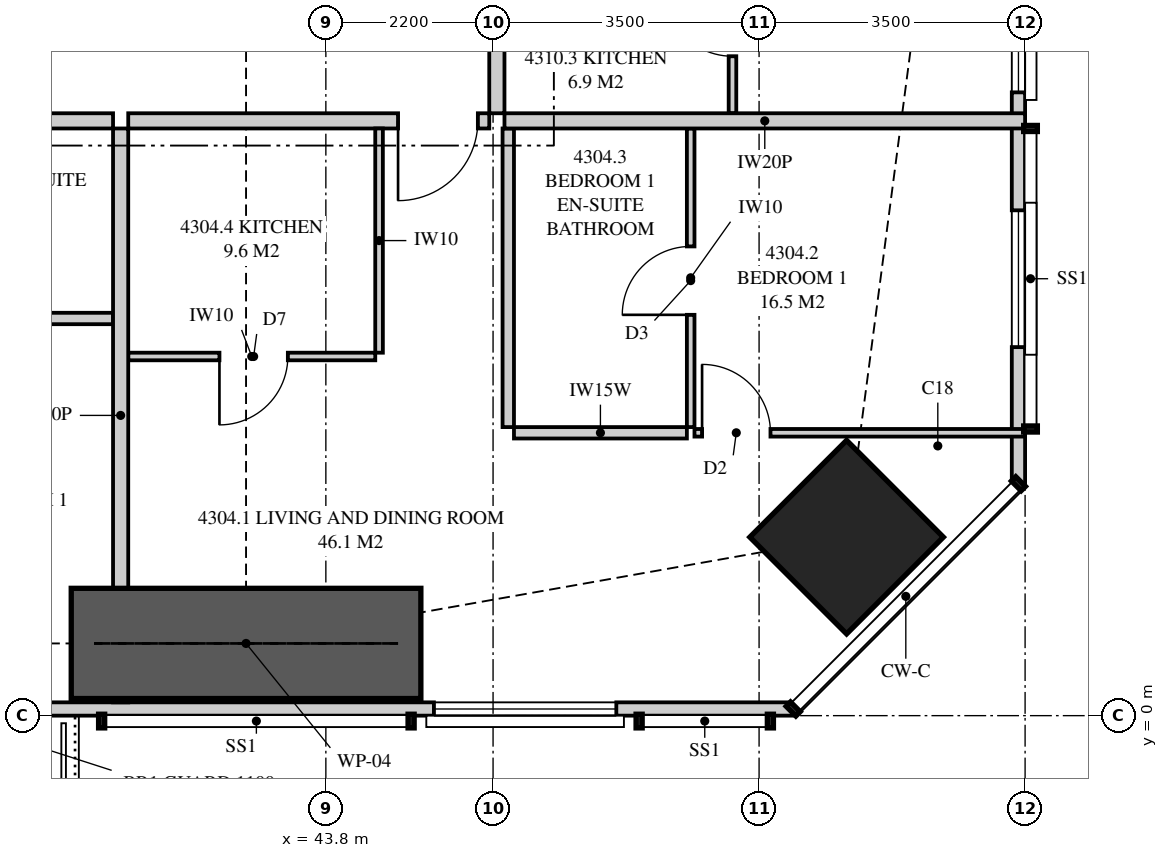
"""IFC4 building model, lengths in metres.
Left out: names, types, materials, properties, quantities, classifications, styles, units other than length and angle.
Written with IfcOpenShell. Run it as: python <this file> out.ifc"""

import sys

from ifc_helpers import new_model, si_unit, direction, frame, frame_2d, origin, origin_2d, place, context, subcontext, project, spatial, polyline, rectangle, outline, extrude, element, fill, save


model = new_model("IFC4")
c1 = context("Model", 3, precision=1e-05, world=origin(), true_north=direction((0.0, 1.0)))
c2 = subcontext(c1, "Body", "Model", "MODEL_VIEW")
j1 = project(units=[si_unit("LENGTHUNIT", "METRE"), si_unit("PLANEANGLEUNIT", "RADIAN")], contexts=[c1])
p1 = place(None, origin())
s1 = spatial("IfcSite", under=j1, at=p1, CompositionType="ELEMENT")
p2 = place(p1, origin())
s2 = spatial("IfcBuilding", under=s1, at=p2, CompositionType="ELEMENT")
p3 = place(p2, frame((0.0, 0.0, 161.05)))
s3 = spatial("IfcBuildingStorey", under=s2, at=p3, CompositionType="ELEMENT", Elevation=161.05)
p4 = place(p3, frame((50.652, 2.348, 0.0), z_axis=(0.0, 0.0, 1.0), x_axis=(0.707106781187, 0.707106781187, 0.0)))
e1 = element("IfcColumn", 1, at=p4, inside=s3, PredefinedType="COLUMN", context=c2, shape_type="SweptSolid", body=[
    extrude(rectangle(XDim=1.8, YDim=1.8, at=origin_2d()), origin(), (0.0, 0.0, 1.0), 3.35),
])
p5 = place(p3, frame((15.051, 0.087, 0.0), z_axis=(0.0, 0.0, 1.0), x_axis=(1.0, 0.0, 0.0)))
e2 = element("IfcWall", 2, at=p5, inside=s3, PredefinedType="SOLIDWALL", context=c2, shape_type="SweptSolid", body=[
    extrude(outline(polyline([(0.0, 0.0), (34.897, 0.0), (34.897, 3.11), (27.91, 3.11), (27.91, 2.15), (27.836, 2.15), (27.836, 3.11), (27.699, 3.11), (27.699, 2.15), (7.199, 2.15), (7.199, 3.11), (7.062, 3.11), (7.062, 2.15), (6.987, 2.15), (6.987, 3.11), (0.0, 3.11), (0.0, 0.0)])), frame((0.0, 0.087, 0.0), z_axis=(0.0, -1.0, 0.0), x_axis=(1.0, 0.0, 0.0)), (0.0, 0.0, 1.0), 0.175),
])
p6 = place(p5, frame((1.625, 0.0, 0.4)))
e3 = element("IfcOpeningElement", 3, at=p6, cuts=e2, PredefinedType="OPENING", context=c2, shape_type="SweptSolid", body=[
    extrude(rectangle(XDim=2.4, YDim=1.7, at=frame_2d((1.2, 0.85))), frame((0.0, 0.097, 0.0), z_axis=(0.0, -1.0, 0.0), x_axis=(1.0, 0.0, 0.0)), (0.0, 0.0, 1.0), 0.195),
])
p7 = place(p5, frame((10.399, 0.0, 0.0)))
e4 = element("IfcOpeningElement", 4, at=p7, cuts=e2, PredefinedType="OPENING", context=c2, shape_type="SweptSolid", body=[
    extrude(rectangle(XDim=1.8, YDim=2.1, at=frame_2d((0.9, 1.05))), frame((0.0, 0.097, 0.0), z_axis=(0.0, -1.0, 0.0), x_axis=(1.0, 0.0, 0.0)), (0.0, 0.0, 1.0), 0.195),
])
p8 = place(p5, frame((13.224, 0.0, 0.4)))
e5 = element("IfcOpeningElement", 5, at=p8, cuts=e2, PredefinedType="OPENING", context=c2, shape_type="SweptSolid", body=[
    extrude(rectangle(XDim=1.8, YDim=1.7, at=frame_2d((0.9, 0.85))), frame((0.0, 0.097, 0.0), z_axis=(0.0, -1.0, 0.0), x_axis=(1.0, 0.0, 0.0)), (0.0, 0.0, 1.0), 0.195),
])
p9 = place(p5, frame((19.849, 0.0, 0.4)))
e6 = element("IfcOpeningElement", 6, at=p9, cuts=e2, PredefinedType="OPENING", context=c2, shape_type="SweptSolid", body=[
    extrude(rectangle(XDim=2.4, YDim=1.7, at=frame_2d((1.2, 0.85))), frame((0.0, 0.097, 0.0), z_axis=(0.0, -1.0, 0.0), x_axis=(1.0, 0.0, 0.0)), (0.0, 0.0, 1.0), 0.195),
])
p10 = place(p5, frame((22.799, 0.0, 0.0)))
e7 = element("IfcOpeningElement", 7, at=p10, cuts=e2, PredefinedType="OPENING", context=c2, shape_type="SweptSolid", body=[
    extrude(rectangle(XDim=1.8, YDim=2.1, at=frame_2d((0.9, 1.05))), frame((0.0, 0.097, 0.0), z_axis=(0.0, -1.0, 0.0), x_axis=(1.0, 0.0, 0.0)), (0.0, 0.0, 1.0), 0.195),
])
p11 = place(p5, frame((30.17, 0.0, 0.4)))
e8 = element("IfcOpeningElement", 8, at=p11, cuts=e2, PredefinedType="OPENING", context=c2, shape_type="SweptSolid", body=[
    extrude(rectangle(XDim=2.4, YDim=1.7, at=frame_2d((1.2, 0.85))), frame((0.0, 0.097, 0.0), z_axis=(0.0, -1.0, 0.0), x_axis=(1.0, 0.0, 0.0)), (0.0, 0.0, 1.0), 0.195),
])
p12 = place(p3, frame((52.913, 3.051, 0.0), z_axis=(0.0, 0.0, 1.0), x_axis=(0.0, 1.0, 0.0)))
e9 = element("IfcWall", 9, at=p12, inside=s3, PredefinedType="SOLIDWALL", context=c2, shape_type="SweptSolid", body=[
    extrude(outline(polyline([(0.0, 0.0), (29.897, 0.0), (29.897, 3.11), (22.167, 3.11), (22.167, 2.15), (22.074, 2.15), (22.074, 3.11), (21.949, 3.11), (21.949, 2.15), (9.949, 2.15), (9.949, 3.11), (9.847, 3.11), (9.847, 2.15), (9.706, 2.15), (9.706, 3.11), (0.0, 3.11), (0.0, 0.0)])), frame((0.0, 0.087, 0.0), z_axis=(0.0, -1.0, 0.0), x_axis=(1.0, 0.0, 0.0)), (0.0, 0.0, 1.0), 0.175),
])
p13 = place(p12, frame((1.797, 0.0, 0.4)))
e10 = element("IfcOpeningElement", 10, at=p13, cuts=e9, PredefinedType="OPENING", context=c2, shape_type="SweptSolid", body=[
    extrude(rectangle(XDim=1.8, YDim=1.7, at=frame_2d((0.9, 0.85))), frame((0.0, 0.097, 0.0), z_axis=(0.0, -1.0, 0.0), x_axis=(1.0, 0.0, 0.0)), (0.0, 0.0, 1.0), 0.195),
])
p14 = place(p12, frame((5.149, 0.0, 0.4)))
e11 = element("IfcOpeningElement", 11, at=p14, cuts=e9, PredefinedType="OPENING", context=c2, shape_type="SweptSolid", body=[
    extrude(rectangle(XDim=2.4, YDim=1.7, at=frame_2d((1.2, 0.85))), frame((0.0, 0.097, 0.0), z_axis=(0.0, -1.0, 0.0), x_axis=(1.0, 0.0, 0.0)), (0.0, 0.0, 1.0), 0.195),
])
p15 = place(p12, frame((15.274, 0.0, 0.0)))
e12 = element("IfcOpeningElement", 12, at=p15, cuts=e9, PredefinedType="OPENING", context=c2, shape_type="SweptSolid", body=[
    extrude(rectangle(XDim=1.8, YDim=2.1, at=frame_2d((0.9, 1.05))), frame((0.0, 0.097, 0.0), z_axis=(0.0, -1.0, 0.0), x_axis=(1.0, 0.0, 0.0)), (0.0, 0.0, 1.0), 0.195),
])
p16 = place(p12, frame((12.349, 0.0, 0.4)))
e13 = element("IfcOpeningElement", 13, at=p16, cuts=e9, PredefinedType="OPENING", context=c2, shape_type="SweptSolid", body=[
    extrude(rectangle(XDim=2.4, YDim=1.7, at=frame_2d((1.2, 0.85))), frame((0.0, 0.097, 0.0), z_axis=(0.0, -1.0, 0.0), x_axis=(1.0, 0.0, 0.0)), (0.0, 0.0, 1.0), 0.195),
])
p17 = place(p12, frame((24.373, 0.0, 0.4)))
e14 = element("IfcOpeningElement", 14, at=p17, cuts=e9, PredefinedType="OPENING", context=c2, shape_type="SweptSolid", body=[
    extrude(rectangle(XDim=1.2, YDim=1.7, at=frame_2d((0.6, 0.85))), frame((0.0, 0.097, 0.0), z_axis=(0.0, -1.0, 0.0), x_axis=(1.0, 0.0, 0.0)), (0.0, 0.0, 1.0), 0.195),
])
p18 = place(p12, frame((26.801, 0.0, 0.4)))
e15 = element("IfcOpeningElement", 15, at=p18, cuts=e9, PredefinedType="OPENING", context=c2, shape_type="SweptSolid", body=[
    extrude(rectangle(XDim=1.8, YDim=1.7, at=frame_2d((0.9, 0.85))), frame((0.0, 0.097, 0.0), z_axis=(0.0, -1.0, 0.0), x_axis=(1.0, 0.0, 0.0)), (0.0, 0.0, 1.0), 0.195),
])
p19 = place(p3, frame((41.1, 0.175, 0.0), z_axis=(0.0, 0.0, 1.0), x_axis=(0.0, 1.0, 0.0)))
e16 = element("IfcWall", 16, at=p19, inside=s3, PredefinedType="PARTITIONING", context=c2, shape_type="SweptSolid", body=[
    extrude(outline(polyline([(0.529, 2.15), (0.0, 2.15), (0.0, 0.0), (0.529, 0.0), (0.529, 0.165), (1.021, 0.165), (1.021, 0.0), (7.55, 0.0), (7.55, 3.11), (1.685, 3.11), (1.685, 2.15), (1.021, 2.15), (1.021, 1.985), (0.529, 1.985), (0.529, 2.15)])), frame((0.0, 0.1, 0.0), z_axis=(0.0, -1.0, 0.0), x_axis=(1.0, 0.0, 0.0)), (0.0, 0.0, 1.0), 0.2),
])
p20 = place(p3, frame((37.55, 5.225, 0.0), z_axis=(0.0, 0.0, 1.0), x_axis=(1.0, 0.0, 0.0)))
e17 = element("IfcWall", 17, at=p20, inside=s3, PredefinedType="PLUMBINGWALL", context=c2, shape_type="SweptSolid", body=[
    extrude(rectangle(XDim=3.45, YDim=0.15, at=frame_2d((1.725, 0.0))), origin(), (0.0, 0.0, 1.0), 3.11),
])
p21 = place(p20, frame((0.4, 0.0, 0.0)))
e18 = element("IfcOpeningElement", 18, at=p21, cuts=e17, PredefinedType="OPENING", context=c2, shape_type="SweptSolid", body=[
    extrude(rectangle(XDim=0.9, YDim=2.1, at=frame_2d((0.45, 1.05))), frame((0.0, 0.085, 0.0), z_axis=(0.0, -1.0, 0.0), x_axis=(1.0, 0.0, 0.0)), (0.0, 0.0, 1.0), 0.17),
])
p22 = place(p3, frame((41.2, 7.825, 0.0), z_axis=(0.0, 0.0, 1.0), x_axis=(1.0, 0.0, 0.0)))
e19 = element("IfcWall", 19, at=p22, inside=s3, PredefinedType="PARTITIONING", context=c2, shape_type="SweptSolid", body=[
    extrude(outline(polyline([(0.0, 0.0), (4.75, 0.0), (4.75, 3.11), (1.887, 3.11), (1.887, 2.541), (1.213, 2.541), (1.213, 3.11), (0.0, 3.11), (0.0, 0.0)])), frame((0.0, 0.1, 0.0), z_axis=(0.0, -1.0, 0.0), x_axis=(1.0, 0.0, 0.0)), (0.0, 0.0, 1.0), 0.2),
])
p23 = place(p22, frame((3.55, 0.0, 0.0)))
e20 = element("IfcOpeningElement", 20, at=p23, cuts=e19, PredefinedType="OPENING", context=c2, shape_type="SweptSolid", body=[
    extrude(rectangle(XDim=1.05, YDim=2.2, at=frame_2d((0.525, 1.1))), frame((0.0, 0.11, 0.0), z_axis=(0.0, -1.0, 0.0), x_axis=(1.0, 0.0, 0.0)), (0.0, 0.0, 1.0), 0.22),
])
p24 = place(p3, frame((48.6, 3.796, 0.0), z_axis=(0.0, 0.0, 1.0), x_axis=(0.0, 1.0, 0.0)))
e21 = element("IfcWall", 21, at=p24, inside=s3, PredefinedType="PARTITIONING", context=c2, shape_type="SweptSolid", body=[
    extrude(rectangle(XDim=3.929, YDim=0.1, at=frame_2d((1.964, 0.0))), origin(), (0.0, 0.0, 1.0), 3.11),
])
p25 = place(p24, frame((1.477, 0.0, 0.0)))
e22 = element("IfcOpeningElement", 22, at=p25, cuts=e21, PredefinedType="OPENING", context=c2, shape_type="SweptSolid", body=[
    extrude(rectangle(XDim=0.9, YDim=2.1, at=frame_2d((0.45, 1.05))), frame((0.0, 0.06, 0.0), z_axis=(0.0, -1.0, 0.0), x_axis=(1.0, 0.0, 0.0)), (0.0, 0.0, 1.0), 0.12),
])
p26 = place(p3, frame((48.65, 3.721, 0.0), z_axis=(0.0, 0.0, 1.0), x_axis=(1.0, 0.0, 0.0)))
e23 = element("IfcWall", 23, at=p26, inside=s3, PredefinedType="PARTITIONING", context=c2, shape_type="SweptSolid", body=[
    extrude(outline(polyline([(0.0, 0.0), (4.35, 0.0), (4.35, 3.11), (3.049, 3.11), (3.049, 2.15), (1.314, 2.15), (1.314, 3.11), (0.0, 3.11), (0.0, 0.0)])), frame((0.0, 0.05, 0.0), z_axis=(0.0, -1.0, 0.0), x_axis=(1.0, 0.0, 0.0)), (0.0, 0.0, 1.0), 0.1),
])
p27 = place(p26, frame((0.1, 0.0, 0.0)))
e24 = element("IfcOpeningElement", 24, at=p27, cuts=e23, PredefinedType="OPENING", context=c2, shape_type="SweptSolid", body=[
    extrude(rectangle(XDim=0.9, YDim=2.1, at=frame_2d((0.45, 1.05))), frame((0.0, 0.06, 0.0), z_axis=(0.0, -1.0, 0.0), x_axis=(1.0, 0.0, 0.0)), (0.0, 0.0, 1.0), 0.12),
])
p28 = place(p3, frame((46.275, 3.721, 0.0), z_axis=(0.0, 0.0, 1.0), x_axis=(1.0, 0.0, 0.0)))
e25 = element("IfcWall", 25, at=p28, inside=s3, PredefinedType="PLUMBINGWALL", context=c2, shape_type="SweptSolid", body=[
    extrude(rectangle(XDim=2.275, YDim=0.15, at=frame_2d((1.138, 0.0))), origin(), (0.0, 0.0, 1.0), 3.11),
])
p29 = place(p3, frame((46.2, 3.796, 0.0), z_axis=(0.0, 0.0, 1.0), x_axis=(0.0, 1.0, 0.0)))
e26 = element("IfcWall", 26, at=p29, inside=s3, PredefinedType="PLUMBINGWALL", context=c2, shape_type="SweptSolid", body=[
    extrude(rectangle(XDim=3.929, YDim=0.15, at=frame_2d((1.964, 0.0))), origin(), (0.0, 0.0, 1.0), 3.11),
])
p30 = place(p3, frame((41.2, 4.725, 0.0), z_axis=(0.0, 0.0, 1.0), x_axis=(1.0, 0.0, 0.0)))
e27 = element("IfcWall", 27, at=p30, inside=s3, PredefinedType="PARTITIONING", context=c2, shape_type="SweptSolid", body=[
    extrude(outline(polyline([(0.0, 0.0), (3.25, 0.0), (3.25, 3.11), (1.837, 3.11), (1.837, 2.541), (1.263, 2.541), (1.263, 3.11), (0.0, 3.11), (0.0, 0.0)])), frame((0.0, 0.05, 0.0), z_axis=(0.0, -1.0, 0.0), x_axis=(1.0, 0.0, 0.0)), (0.0, 0.0, 1.0), 0.1),
])
p31 = place(p30, frame((1.2, 0.0, 0.0)))
e28 = element("IfcOpeningElement", 28, at=p31, cuts=e27, PredefinedType="OPENING", context=c2, shape_type="SweptSolid", body=[
    extrude(rectangle(XDim=0.9, YDim=2.1, at=frame_2d((0.45, 1.05))), frame((0.0, 0.06, 0.0), z_axis=(0.0, -1.0, 0.0), x_axis=(1.0, 0.0, 0.0)), (0.0, 0.0, 1.0), 0.12),
])
p32 = place(p3, frame((44.5, 4.775, 0.0), z_axis=(0.0, 0.0, 1.0), x_axis=(0.0, 1.0, 0.0)))
e29 = element("IfcWall", 29, at=p32, inside=s3, PredefinedType="PARTITIONING", context=c2, shape_type="SweptSolid", body=[
    extrude(rectangle(XDim=2.95, YDim=0.1, at=frame_2d((1.475, 0.0))), origin(), (0.0, 0.0, 1.0), 3.11),
])
p33 = place(p3, frame((46.15, 7.825, 0.0), z_axis=(0.0, 0.0, 1.0), x_axis=(1.0, 0.0, 0.0)))
e30 = element("IfcWall", 30, at=p33, inside=s3, PredefinedType="PARTITIONING", context=c2, shape_type="SweptSolid", body=[
    extrude(outline(polyline([(0.0, 0.0), (6.85, 0.0), (6.85, 3.11), (6.138, 3.11), (6.138, 2.15), (4.303, 2.15), (4.303, 3.11), (0.0, 3.11), (0.0, 0.0)])), frame((0.0, 0.1, 0.0), z_axis=(0.0, -1.0, 0.0), x_axis=(1.0, 0.0, 0.0)), (0.0, 0.0, 1.0), 0.2),
])
p34 = place(p3, frame((46.05, 7.925, 0.0), z_axis=(0.0, 0.0, 1.0), x_axis=(0.0, 1.0, 0.0)))
e31 = element("IfcWall", 31, at=p34, inside=s3, PredefinedType="PARTITIONING", context=c2, shape_type="SweptSolid", body=[
    extrude(outline(polyline([(0.0, 0.0), (6.475, 0.0), (6.475, 3.11), (5.412, 3.11), (5.412, 2.541), (4.738, 2.541), (4.738, 3.11), (0.0, 3.11), (0.0, 0.0)])), frame((0.0, 0.1, 0.0), z_axis=(0.0, -1.0, 0.0), x_axis=(1.0, 0.0, 0.0)), (0.0, 0.0, 1.0), 0.2),
])
p35 = place(p34, frame((2.738, 0.0, 0.0)))
e32 = element("IfcOpeningElement", 32, at=p35, cuts=e31, PredefinedType="OPENING", context=c2, shape_type="SweptSolid", body=[
    extrude(rectangle(XDim=1.05, YDim=2.2, at=frame_2d((0.525, 1.1))), frame((0.0, 0.11, 0.0), z_axis=(0.0, -1.0, 0.0), x_axis=(1.0, 0.0, 0.0)), (0.0, 0.0, 1.0), 0.22),
])
p36 = place(p3, frame((49.15, 7.925, 0.0), z_axis=(0.0, 0.0, 1.0), x_axis=(0.0, 1.0, 0.0)))
e33 = element("IfcWall", 33, at=p36, inside=s3, PredefinedType="PARTITIONING", context=c2, shape_type="SweptSolid", body=[
    extrude(rectangle(XDim=2.35, YDim=0.1, at=frame_2d((1.175, 0.0))), origin(), (0.0, 0.0, 1.0), 3.11),
])
p37 = place(p36, frame((0.75, 0.0, 0.0)))
e34 = element("IfcOpeningElement", 34, at=p37, cuts=e33, PredefinedType="OPENING", context=c2, shape_type="SweptSolid", body=[
    extrude(rectangle(XDim=0.9, YDim=2.1, at=frame_2d((0.45, 1.05))), frame((0.0, 0.06, 0.0), z_axis=(0.0, -1.0, 0.0), x_axis=(1.0, 0.0, 0.0)), (0.0, 0.0, 1.0), 0.12),
])
p38 = place(p3, frame((37.25, 7.825, 0.0), z_axis=(0.0, 0.0, 1.0), x_axis=(1.0, 0.0, 0.0)))
e35 = element("IfcWall", 35, at=p38, inside=s3, PredefinedType="PARTITIONING", context=c2, shape_type="SweptSolid", body=[
    extrude(rectangle(XDim=3.75, YDim=0.2, at=frame_2d((1.875, 0.0))), origin(), (0.0, 0.0, 1.0), 3.11),
])
p39 = place(p3, frame((40.45, 0.95, 0.0), z_axis=(0.0, 0.0, 1.0), x_axis=(1.0, 0.0, 0.0)))
e36 = element("IfcWall", 36, at=p39, inside=s3, PredefinedType="SHEAR", context=c2, shape_type="SweptSolid", body=[
    extrude(rectangle(XDim=4.6, YDim=1.45, at=frame_2d((2.3, 0.0))), origin(), (0.0, 0.0, 1.0), 3.35),
])
p40 = place(p11, origin())
e37 = element("IfcWindow", 37, at=p40, inside=s3, PartitioningType="SINGLE_PANEL", PredefinedType="WINDOW", context=c2, shape_type="SweptSolid", body=[
    extrude(rectangle(XDim=2.4, YDim=1.7, at=frame_2d((1.2, 0.85))), frame((0.0, 0.03, 0.0), z_axis=(0.0, -1.0, 0.0), x_axis=(1.0, 0.0, 0.0)), (0.0, 0.0, 1.0), 0.06),
])
fill(e8, e37)
p41 = place(p13, origin())
e38 = element("IfcWindow", 38, at=p41, inside=s3, PartitioningType="SINGLE_PANEL", PredefinedType="WINDOW", context=c2, shape_type="SweptSolid", body=[
    extrude(rectangle(XDim=1.8, YDim=1.7, at=frame_2d((0.9, 0.85))), frame((0.0, 0.03, 0.0), z_axis=(0.0, -1.0, 0.0), x_axis=(1.0, 0.0, 0.0)), (0.0, 0.0, 1.0), 0.06),
])
fill(e10, e38)
p42 = place(p14, origin())
e39 = element("IfcWindow", 39, at=p42, inside=s3, PartitioningType="SINGLE_PANEL", PredefinedType="WINDOW", context=c2, shape_type="SweptSolid", body=[
    extrude(rectangle(XDim=2.4, YDim=1.7, at=frame_2d((1.2, 0.85))), frame((0.0, 0.03, 0.0), z_axis=(0.0, -1.0, 0.0), x_axis=(1.0, 0.0, 0.0)), (0.0, 0.0, 1.0), 0.06),
])
fill(e11, e39)
p43 = place(p23, frame((1.05, 0.0, 0.0), z_axis=(0.0, 0.0, 1.0), x_axis=(-1.0, 0.0, 0.0)))
e40 = element("IfcDoor", 40, at=p43, inside=s3, OperationType="SINGLE_SWING_RIGHT", PredefinedType="DOOR", context=c2, shape_type="SweptSolid", body=[
    extrude(rectangle(XDim=1.05, YDim=2.2, at=frame_2d((0.525, 1.1))), frame((0.0, 0.025, 0.0), z_axis=(0.0, -1.0, 0.0), x_axis=(1.0, 0.0, 0.0)), (0.0, 0.0, 1.0), 0.05),
])
fill(e20, e40)
p44 = place(p27, origin())
e41 = element("IfcDoor", 41, at=p44, inside=s3, OperationType="SINGLE_SWING_LEFT", PredefinedType="DOOR", context=c2, shape_type="SweptSolid", body=[
    extrude(rectangle(XDim=0.9, YDim=2.1, at=frame_2d((0.45, 1.05))), frame((0.0, 0.025, 0.0), z_axis=(0.0, -1.0, 0.0), x_axis=(1.0, 0.0, 0.0)), (0.0, 0.0, 1.0), 0.05),
])
fill(e24, e41)
p45 = place(p25, origin())
e42 = element("IfcDoor", 42, at=p45, inside=s3, OperationType="SINGLE_SWING_LEFT", PredefinedType="DOOR", context=c2, shape_type="SweptSolid", body=[
    extrude(rectangle(XDim=0.9, YDim=2.1, at=frame_2d((0.45, 1.05))), frame((0.0, 0.025, 0.0), z_axis=(0.0, -1.0, 0.0), x_axis=(1.0, 0.0, 0.0)), (0.0, 0.0, 1.0), 0.05),
])
fill(e22, e42)
p46 = place(p31, frame((0.9, 0.0, 0.0), z_axis=(0.0, 0.0, 1.0), x_axis=(-1.0, 0.0, 0.0)))
e43 = element("IfcDoor", 43, at=p46, inside=s3, OperationType="SINGLE_SWING_RIGHT", PredefinedType="DOOR", context=c2, shape_type="SweptSolid", body=[
    extrude(rectangle(XDim=0.9, YDim=2.1, at=frame_2d((0.45, 1.05))), frame((0.0, 0.025, 0.0), z_axis=(0.0, -1.0, 0.0), x_axis=(1.0, 0.0, 0.0)), (0.0, 0.0, 1.0), 0.05),
])
fill(e28, e43)
p47 = place(p37, origin())
e44 = element("IfcDoor", 44, at=p47, inside=s3, OperationType="SINGLE_SWING_RIGHT", PredefinedType="DOOR", context=c2, shape_type="SweptSolid", body=[
    extrude(rectangle(XDim=0.9, YDim=2.1, at=frame_2d((0.45, 1.05))), frame((0.0, 0.025, 0.0), z_axis=(0.0, -1.0, 0.0), x_axis=(1.0, 0.0, 0.0)), (0.0, 0.0, 1.0), 0.05),
])
fill(e34, e44)
save(model, sys.argv[1])
